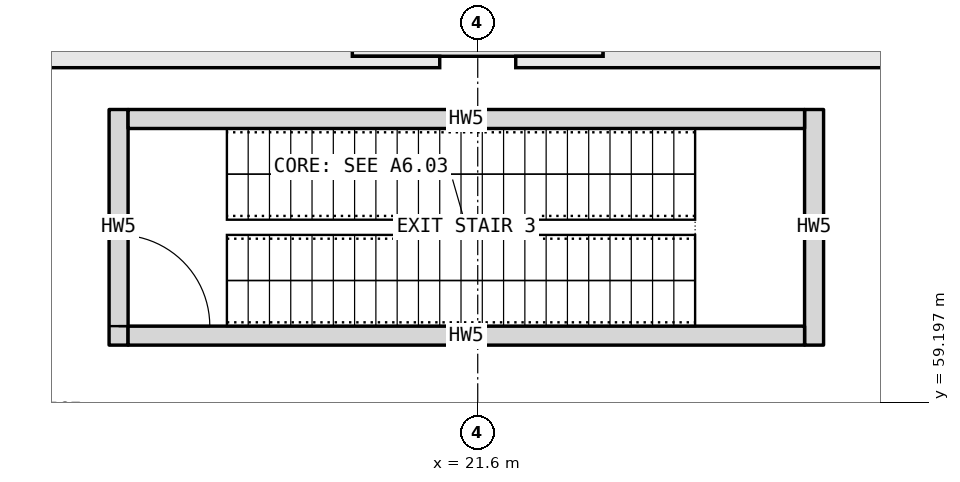
"""IFC4 building model, lengths in metres.
Left out: names, types, materials, properties, quantities, classifications, styles, units other than length and angle.
Written with IfcOpenShell. Run it as: python <this file> out.ifc"""

import sys

from ifc_helpers import new_model, si_unit, direction, frame, frame_2d, origin, place, context, subcontext, project, spatial, rectangle, extrude, element, fill, save


model = new_model("IFC4")
c1 = context("Model", 3, precision=1e-05, world=origin(), true_north=direction((0.0, 1.0)))
c2 = subcontext(c1, "Body", "Model", "MODEL_VIEW")
j1 = project(units=[si_unit("LENGTHUNIT", "METRE"), si_unit("PLANEANGLEUNIT", "RADIAN")], contexts=[c1])
p1 = place(None, origin())
s1 = spatial("IfcSite", under=j1, at=p1, CompositionType="ELEMENT")
p2 = place(p1, origin())
s2 = spatial("IfcBuilding", under=s1, at=p2, CompositionType="ELEMENT")
p3 = place(p2, frame((0.0, 0.0, -8.0)))
s3 = spatial("IfcBuildingStorey", under=s2, at=p3, CompositionType="ELEMENT", Elevation=-8.0)
p4 = place(p3, frame((16.875, 59.95, 0.0), z_axis=(0.0, 0.0, 1.0), x_axis=(0.0, 1.0, 0.0)))
e1 = element("IfcWall", 1, at=p4, inside=s3, PredefinedType="SOLIDWALL", context=c2, shape_type="SweptSolid", body=[
    extrude(rectangle(XDim=3.1, YDim=0.25, at=frame_2d((1.55, 0.0))), origin(), (0.0, 0.0, 1.0), 7.595),
])
p5 = place(p4, frame((0.25, 0.0, 0.0)))
e2 = element("IfcOpeningElement", 2, at=p5, cuts=e1, PredefinedType="OPENING", context=c2, shape_type="SweptSolid", body=[
    extrude(rectangle(XDim=1.2, YDim=2.1, at=frame_2d((0.6, 1.05))), frame((0.0, 0.135, 0.0), z_axis=(0.0, -1.0, 0.0), x_axis=(1.0, 0.0, 0.0)), (0.0, 0.0, 1.0), 0.27),
])
p6 = place(p3, frame((26.025, 59.95, 0.0), z_axis=(0.0, 0.0, 1.0), x_axis=(0.0, 1.0, 0.0)))
e3 = element("IfcWall", 3, at=p6, inside=s3, PredefinedType="SOLIDWALL", context=c2, shape_type="SweptSolid", body=[
    extrude(rectangle(XDim=3.1, YDim=0.25, at=frame_2d((1.55, 0.0))), origin(), (0.0, 0.0, 1.0), 7.595),
])
for number, where, z_axis, x_axis in (
    (4, (17.0, 60.075, 0.0), (0.0, 0.0, 1.0), (1.0, 0.0, 0.0)),
    (5, (17.0, 62.925, 0.0), (0.0, 0.0, 1.0), (1.0, 0.0, 0.0)),
):
    element("IfcWall", number, at=place(p3, frame(where, z_axis=z_axis, x_axis=x_axis)), inside=s3, PredefinedType="SOLIDWALL", context=c2, shape_type="SweptSolid", body=[
        extrude(rectangle(XDim=8.9, YDim=0.25, at=frame_2d((4.45, 0.0))), origin(), (0.0, 0.0, 1.0), 7.595),
    ])
p7 = place(p5, frame((1.2, 0.0, 0.0), z_axis=(0.0, 0.0, 1.0), x_axis=(-1.0, 0.0, 0.0)))
e6 = element("IfcDoor", 6, at=p7, inside=s3, OperationType="SINGLE_SWING_RIGHT", PredefinedType="DOOR", context=c2, shape_type="SweptSolid", body=[
    extrude(rectangle(XDim=1.2, YDim=2.1, at=frame_2d((0.6, 1.05))), frame((0.0, 0.025, 0.0), z_axis=(0.0, -1.0, 0.0), x_axis=(1.0, 0.0, 0.0)), (0.0, 0.0, 1.0), 0.05),
])
fill(e2, e6)
save(model, sys.argv[1])
